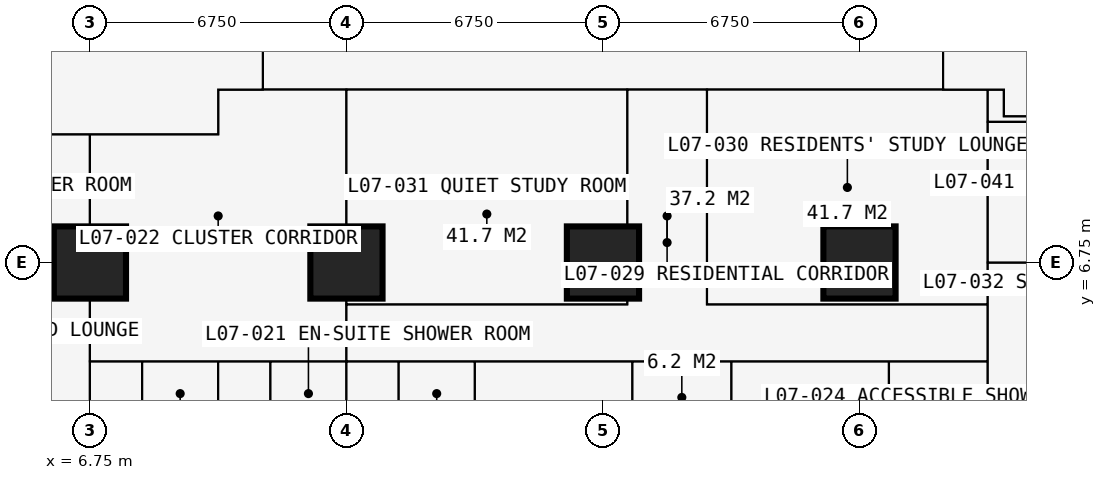
"""IFC4 building model, lengths in metres.
Left out: names, types, materials, properties, quantities, classifications, styles, units other than length and angle.
Written with IfcOpenShell. Run it as: python <this file> out.ifc"""

import sys

from ifc_helpers import new_model, si_unit, direction, frame, frame_2d, origin, origin_2d, place, context, subcontext, project, spatial, rectangle, extrude, element, fill, save


model = new_model("IFC4")
c1 = context("Model", 3, precision=1e-05, world=origin(), true_north=direction((0.0, 1.0)))
c2 = subcontext(c1, "Body", "Model", "MODEL_VIEW")
j1 = project(units=[si_unit("LENGTHUNIT", "METRE"), si_unit("PLANEANGLEUNIT", "RADIAN")], contexts=[c1])
p1 = place(None, origin())
s1 = spatial("IfcSite", under=j1, at=p1, CompositionType="ELEMENT")
p2 = place(p1, origin())
s2 = spatial("IfcBuilding", under=s1, at=p2, CompositionType="ELEMENT")
p3 = place(p2, frame((0.0, 0.0, 28.8)))
s3 = spatial("IfcBuildingStorey", under=s2, at=p3, CompositionType="ELEMENT", Elevation=28.8)
for number, where, z_axis, x_axis in (
    (1, (6.75, 6.75, 0.0), (0.0, 0.0, 1.0), (1.0, 0.0, 0.0)),
    (2, (13.5, 6.75, 0.0), (0.0, 0.0, 1.0), (1.0, 0.0, 0.0)),
    (3, (20.25, 6.75, 0.0), (0.0, 0.0, 1.0), (1.0, 0.0, 0.0)),
    (4, (27.0, 6.75, 0.0), (0.0, 0.0, 1.0), (1.0, 0.0, 0.0)),
):
    element("IfcColumn", number, at=place(p3, frame(where, z_axis=z_axis, x_axis=x_axis)), inside=s3, PredefinedType="COLUMN", context=c2, shape_type="SweptSolid", body=[
        extrude(rectangle(XDim=1.9, YDim=1.9, at=origin_2d()), origin(), (0.0, 0.0, 1.0), 3.6),
    ])
p4 = place(p3, frame((-0.734, 10.125, 0.0), z_axis=(0.0, 0.0, 1.0), x_axis=(1.0, 0.0, 0.0)))
e5 = element("IfcWall", 5, at=p4, inside=s3, PredefinedType="PARTITIONING", context=c2, shape_type="SweptSolid", body=[
    extrude(rectangle(XDim=10.859, YDim=0.15, at=frame_2d((5.429, 0.0))), origin(), (0.0, 0.0, 1.0), 3.375),
])
p5 = place(p4, frame((5.134, 0.0, 0.0)))
e6 = element("IfcOpeningElement", 6, at=p5, cuts=e5, PredefinedType="OPENING", context=c2, shape_type="SweptSolid", body=[
    extrude(rectangle(XDim=1.0, YDim=2.2, at=frame_2d((0.5, 1.1))), frame((0.0, 0.085, 0.0), z_axis=(0.0, -1.0, 0.0), x_axis=(1.0, 0.0, 0.0)), (0.0, 0.0, 1.0), 0.17),
])
p6 = place(p3, frame((6.75, -0.734, 0.0), z_axis=(0.0, 0.0, 1.0), x_axis=(0.0, 1.0, 0.0)))
e7 = element("IfcWall", 7, at=p6, inside=s3, PredefinedType="PARTITIONING", context=c2, shape_type="SweptSolid", body=[
    extrude(rectangle(XDim=10.859, YDim=0.15, at=frame_2d((5.429, 0.0))), origin(), (0.0, 0.0, 1.0), 2.877),
])
p7 = place(p3, frame((6.75, 4.15, 0.0), z_axis=(0.0, 0.0, 1.0), x_axis=(1.0, 0.0, 0.0)))
e8 = element("IfcWall", 8, at=p7, inside=s3, PredefinedType="PARTITIONING", context=c2, shape_type="SweptSolid", body=[
    extrude(rectangle(XDim=23.625, YDim=0.15, at=frame_2d((11.812, 0.0))), origin(), (0.0, 0.0, 1.0), 3.375),
])
p8 = place(p7, frame((0.2, 0.0, 0.0)))
e9 = element("IfcOpeningElement", 9, at=p8, cuts=e8, PredefinedType="OPENING", context=c2, shape_type="SweptSolid", body=[
    extrude(rectangle(XDim=0.95, YDim=2.2, at=frame_2d((0.475, 1.1))), frame((0.0, 0.085, 0.0), z_axis=(0.0, -1.0, 0.0), x_axis=(1.0, 0.0, 0.0)), (0.0, 0.0, 1.0), 0.17),
])
p9 = place(p7, frame((3.625, 0.0, 0.0)))
e10 = element("IfcOpeningElement", 10, at=p9, cuts=e8, PredefinedType="OPENING", context=c2, shape_type="SweptSolid", body=[
    extrude(rectangle(XDim=0.95, YDim=2.2, at=frame_2d((0.475, 1.1))), frame((0.0, 0.085, 0.0), z_axis=(0.0, -1.0, 0.0), x_axis=(1.0, 0.0, 0.0)), (0.0, 0.0, 1.0), 0.17),
])
p10 = place(p7, frame((18.475, 0.0, 0.0)))
e11 = element("IfcOpeningElement", 11, at=p10, cuts=e8, PredefinedType="OPENING", context=c2, shape_type="SweptSolid", body=[
    extrude(rectangle(XDim=0.95, YDim=2.2, at=frame_2d((0.475, 1.1))), frame((0.0, 0.085, 0.0), z_axis=(0.0, -1.0, 0.0), x_axis=(1.0, 0.0, 0.0)), (0.0, 0.0, 1.0), 0.17),
])
p11 = place(p7, frame((11.725, 0.0, 0.0)))
e12 = element("IfcOpeningElement", 12, at=p11, cuts=e8, PredefinedType="OPENING", context=c2, shape_type="SweptSolid", body=[
    extrude(rectangle(XDim=0.95, YDim=2.2, at=frame_2d((0.475, 1.1))), frame((0.0, 0.085, 0.0), z_axis=(0.0, -1.0, 0.0), x_axis=(1.0, 0.0, 0.0)), (0.0, 0.0, 1.0), 0.17),
])
p12 = place(p7, frame((6.95, 0.0, 0.0)))
e13 = element("IfcOpeningElement", 13, at=p12, cuts=e8, PredefinedType="OPENING", context=c2, shape_type="SweptSolid", body=[
    extrude(rectangle(XDim=0.95, YDim=2.2, at=frame_2d((0.475, 1.1))), frame((0.0, 0.085, 0.0), z_axis=(0.0, -1.0, 0.0), x_axis=(1.0, 0.0, 0.0)), (0.0, 0.0, 1.0), 0.17),
])
p13 = place(p3, frame((8.125, 1.95, 0.0), z_axis=(0.0, 0.0, 1.0), x_axis=(0.0, 1.0, 0.0)))
e14 = element("IfcWall", 14, at=p13, inside=s3, PredefinedType="PARTITIONING", context=c2, shape_type="SweptSolid", body=[
    extrude(rectangle(XDim=2.2, YDim=0.1, at=frame_2d((1.1, 0.0))), origin(), (0.0, 0.0, 1.0), 3.375),
])
p14 = place(p13, frame((0.65, 0.0, 0.0)))
e15 = element("IfcOpeningElement", 15, at=p14, cuts=e14, PredefinedType="OPENING", context=c2, shape_type="SweptSolid", body=[
    extrude(rectangle(XDim=0.9, YDim=2.2, at=frame_2d((0.45, 1.1))), frame((0.0, 0.06, 0.0), z_axis=(0.0, -1.0, 0.0), x_axis=(1.0, 0.0, 0.0)), (0.0, 0.0, 1.0), 0.12),
])
p15 = place(p3, frame((10.125, -0.734, 0.0), z_axis=(0.0, 0.0, 1.0), x_axis=(0.0, 1.0, 0.0)))
e16 = element("IfcWall", 16, at=p15, inside=s3, PredefinedType="PARTITIONING", context=c2, shape_type="SweptSolid", body=[
    extrude(rectangle(XDim=4.884, YDim=0.175, at=frame_2d((2.442, 0.0))), origin(), (0.0, 0.0, 1.0), 3.375),
])
p16 = place(p3, frame((10.125, 10.125, 0.0), z_axis=(0.0, 0.0, 1.0), x_axis=(0.0, 1.0, 0.0)))
e17 = element("IfcWall", 17, at=p16, inside=s3, PredefinedType="PARTITIONING", context=c2, shape_type="SweptSolid", body=[
    extrude(rectangle(XDim=1.175, YDim=0.15, at=frame_2d((0.587, 0.0))), origin(), (0.0, 0.0, 1.0), 3.375),
])
p17 = place(p3, frame((10.125, 11.3, 0.0), z_axis=(0.0, 0.0, 1.0), x_axis=(1.0, 0.0, 0.0)))
e18 = element("IfcWall", 18, at=p17, inside=s3, PredefinedType="PARTITIONING", context=c2, shape_type="SweptSolid", body=[
    extrude(rectangle(XDim=20.675, YDim=0.15, at=frame_2d((10.337, 0.0))), origin(), (0.0, 0.0, 1.0), 3.375),
])
p18 = place(p17, frame((1.775, 0.0, 0.0)))
e19 = element("IfcOpeningElement", 19, at=p18, cuts=e18, PredefinedType="OPENING", context=c2, shape_type="SweptSolid", body=[
    extrude(rectangle(XDim=1.0, YDim=2.2, at=frame_2d((0.5, 1.1))), frame((0.0, 0.085, 0.0), z_axis=(0.0, -1.0, 0.0), x_axis=(1.0, 0.0, 0.0)), (0.0, 0.0, 1.0), 0.17),
])
p19 = place(p17, frame((11.312, 0.0, 0.0)))
e20 = element("IfcOpeningElement", 20, at=p19, cuts=e18, PredefinedType="OPENING", context=c2, shape_type="SweptSolid", body=[
    extrude(rectangle(XDim=1.0, YDim=2.2, at=frame_2d((0.5, 1.1))), frame((0.0, 0.085, 0.0), z_axis=(0.0, -1.0, 0.0), x_axis=(1.0, 0.0, 0.0)), (0.0, 0.0, 1.0), 0.17),
])
p20 = place(p3, frame((11.3, 11.3, 0.0), z_axis=(0.0, 0.0, 1.0), x_axis=(0.0, 1.0, 0.0)))
e21 = element("IfcWall", 21, at=p20, inside=s3, PredefinedType="PARTITIONING", context=c2, shape_type="SweptSolid", body=[
    extrude(rectangle(XDim=19.075, YDim=0.15, at=frame_2d((9.538, 0.0))), origin(), (0.0, 0.0, 1.0), 3.375),
])
p21 = place(p20, frame((10.137, 0.0, 0.0)))
e22 = element("IfcOpeningElement", 22, at=p21, cuts=e21, PredefinedType="OPENING", context=c2, shape_type="SweptSolid", body=[
    extrude(rectangle(XDim=1.0, YDim=2.2, at=frame_2d((0.5, 1.1))), frame((0.0, 0.085, 0.0), z_axis=(0.0, -1.0, 0.0), x_axis=(1.0, 0.0, 0.0)), (0.0, 0.0, 1.0), 0.17),
])
p22 = place(p3, frame((11.5, 1.95, 0.0), z_axis=(0.0, 0.0, 1.0), x_axis=(0.0, 1.0, 0.0)))
e23 = element("IfcWall", 23, at=p22, inside=s3, PredefinedType="PARTITIONING", context=c2, shape_type="SweptSolid", body=[
    extrude(rectangle(XDim=2.2, YDim=0.1, at=frame_2d((1.1, 0.0))), origin(), (0.0, 0.0, 1.0), 3.375),
])
p23 = place(p22, frame((0.65, 0.0, 0.0)))
e24 = element("IfcOpeningElement", 24, at=p23, cuts=e23, PredefinedType="OPENING", context=c2, shape_type="SweptSolid", body=[
    extrude(rectangle(XDim=0.9, YDim=2.2, at=frame_2d((0.45, 1.1))), frame((0.0, 0.06, 0.0), z_axis=(0.0, -1.0, 0.0), x_axis=(1.0, 0.0, 0.0)), (0.0, 0.0, 1.0), 0.12),
])
p24 = place(p3, frame((13.5, -0.734, 0.0), z_axis=(0.0, 0.0, 1.0), x_axis=(0.0, 1.0, 0.0)))
e25 = element("IfcWall", 25, at=p24, inside=s3, PredefinedType="PARTITIONING", context=c2, shape_type="SweptSolid", body=[
    extrude(rectangle(XDim=12.034, YDim=0.15, at=frame_2d((6.017, 0.0))), origin(), (0.0, 0.0, 1.0), 2.61),
])
p25 = place(p3, frame((13.5, 5.65, 0.0), z_axis=(0.0, 0.0, 1.0), x_axis=(1.0, 0.0, 0.0)))
e26 = element("IfcWall", 26, at=p25, inside=s3, PredefinedType="PARTITIONING", context=c2, shape_type="SweptSolid", body=[
    extrude(rectangle(XDim=7.387, YDim=0.15, at=frame_2d((3.694, 0.0))), origin(), (0.0, 0.0, 1.0), 3.375),
])
p26 = place(p25, frame((3.2, 0.0, 0.0)))
e27 = element("IfcOpeningElement", 27, at=p26, cuts=e26, PredefinedType="OPENING", context=c2, shape_type="SweptSolid", body=[
    extrude(rectangle(XDim=0.95, YDim=2.2, at=frame_2d((0.475, 1.1))), frame((0.0, 0.085, 0.0), z_axis=(0.0, -1.0, 0.0), x_axis=(1.0, 0.0, 0.0)), (0.0, 0.0, 1.0), 0.17),
])
p27 = place(p3, frame((14.875, 1.95, 0.0), z_axis=(0.0, 0.0, 1.0), x_axis=(0.0, 1.0, 0.0)))
e28 = element("IfcWall", 28, at=p27, inside=s3, PredefinedType="PARTITIONING", context=c2, shape_type="SweptSolid", body=[
    extrude(rectangle(XDim=2.2, YDim=0.1, at=frame_2d((1.1, 0.0))), origin(), (0.0, 0.0, 1.0), 3.375),
])
p28 = place(p3, frame((16.875, -0.734, 0.0), z_axis=(0.0, 0.0, 1.0), x_axis=(0.0, 1.0, 0.0)))
e29 = element("IfcWall", 29, at=p28, inside=s3, PredefinedType="PARTITIONING", context=c2, shape_type="SweptSolid", body=[
    extrude(rectangle(XDim=4.884, YDim=0.175, at=frame_2d((2.442, 0.0))), origin(), (0.0, 0.0, 1.0), 3.375),
])
p29 = place(p28, frame((3.334, 0.0, 0.0)))
e30 = element("IfcOpeningElement", 30, at=p29, cuts=e29, PredefinedType="OPENING", context=c2, shape_type="SweptSolid", body=[
    extrude(rectangle(XDim=0.9, YDim=2.2, at=frame_2d((0.45, 1.1))), frame((0.0, 0.097, 0.0), z_axis=(0.0, -1.0, 0.0), x_axis=(1.0, 0.0, 0.0)), (0.0, 0.0, 1.0), 0.195),
])
p30 = place(p3, frame((20.887, 5.65, 0.0), z_axis=(0.0, 0.0, 1.0), x_axis=(0.0, 1.0, 0.0)))
e31 = element("IfcWall", 31, at=p30, inside=s3, PredefinedType="PARTITIONING", context=c2, shape_type="SweptSolid", body=[
    extrude(rectangle(XDim=5.65, YDim=0.15, at=frame_2d((2.825, 0.0))), origin(), (0.0, 0.0, 1.0), 3.375),
])
p31 = place(p3, frame((21.025, 1.75, 0.0), z_axis=(0.0, 0.0, 1.0), x_axis=(0.0, 1.0, 0.0)))
e32 = element("IfcWall", 32, at=p31, inside=s3, PredefinedType="PARTITIONING", context=c2, shape_type="SweptSolid", body=[
    extrude(rectangle(XDim=2.4, YDim=0.1, at=frame_2d((1.2, 0.0))), origin(), (0.0, 0.0, 1.0), 3.375),
])
p32 = place(p3, frame((22.988, 5.65, 0.0), z_axis=(0.0, 0.0, 1.0), x_axis=(1.0, 0.0, 0.0)))
e33 = element("IfcWall", 33, at=p32, inside=s3, PredefinedType="PARTITIONING", context=c2, shape_type="SweptSolid", body=[
    extrude(rectangle(XDim=7.387, YDim=0.15, at=frame_2d((3.694, 0.0))), origin(), (0.0, 0.0, 1.0), 3.375),
])
p33 = place(p32, frame((2.1, 0.0, 0.0)))
e34 = element("IfcOpeningElement", 34, at=p33, cuts=e33, PredefinedType="OPENING", context=c2, shape_type="SweptSolid", body=[
    extrude(rectangle(XDim=0.95, YDim=2.2, at=frame_2d((0.475, 1.1))), frame((0.0, 0.085, 0.0), z_axis=(0.0, -1.0, 0.0), x_axis=(1.0, 0.0, 0.0)), (0.0, 0.0, 1.0), 0.17),
])
p34 = place(p3, frame((22.988, 5.65, 0.0), z_axis=(0.0, 0.0, 1.0), x_axis=(0.0, 1.0, 0.0)))
e35 = element("IfcWall", 35, at=p34, inside=s3, PredefinedType="PARTITIONING", context=c2, shape_type="SweptSolid", body=[
    extrude(rectangle(XDim=5.65, YDim=0.15, at=frame_2d((2.825, 0.0))), origin(), (0.0, 0.0, 1.0), 3.375),
])
p35 = place(p3, frame((23.625, -0.734, 0.0), z_axis=(0.0, 0.0, 1.0), x_axis=(0.0, 1.0, 0.0)))
e36 = element("IfcWall", 36, at=p35, inside=s3, PredefinedType="PARTITIONING", context=c2, shape_type="SweptSolid", body=[
    extrude(rectangle(XDim=4.884, YDim=0.175, at=frame_2d((2.442, 0.0))), origin(), (0.0, 0.0, 1.0), 3.375),
])
p36 = place(p35, frame((3.234, 0.0, 0.0)))
e37 = element("IfcOpeningElement", 37, at=p36, cuts=e36, PredefinedType="OPENING", context=c2, shape_type="SweptSolid", body=[
    extrude(rectangle(XDim=0.9, YDim=2.2, at=frame_2d((0.45, 1.1))), frame((0.0, 0.097, 0.0), z_axis=(0.0, -1.0, 0.0), x_axis=(1.0, 0.0, 0.0)), (0.0, 0.0, 1.0), 0.195),
])
p37 = place(p3, frame((27.775, 1.75, 0.0), z_axis=(0.0, 0.0, 1.0), x_axis=(0.0, 1.0, 0.0)))
e38 = element("IfcWall", 38, at=p37, inside=s3, PredefinedType="PARTITIONING", context=c2, shape_type="SweptSolid", body=[
    extrude(rectangle(XDim=2.4, YDim=0.1, at=frame_2d((1.2, 0.0))), origin(), (0.0, 0.0, 1.0), 3.375),
])
p38 = place(p3, frame((29.2, 11.3, 0.0), z_axis=(0.0, 0.0, 1.0), x_axis=(0.0, 1.0, 0.0)))
e39 = element("IfcWall", 39, at=p38, inside=s3, PredefinedType="PARTITIONING", context=c2, shape_type="SweptSolid", body=[
    extrude(rectangle(XDim=17.9, YDim=0.2, at=frame_2d((8.95, 0.0))), origin(), (0.0, 0.0, 1.0), 3.375),
])
p39 = place(p38, frame((8.35, 0.0, 0.0)))
e40 = element("IfcOpeningElement", 40, at=p39, cuts=e39, PredefinedType="OPENING", context=c2, shape_type="SweptSolid", body=[
    extrude(rectangle(XDim=1.2, YDim=2.2, at=frame_2d((0.6, 1.1))), frame((0.0, 0.11, 0.0), z_axis=(0.0, -1.0, 0.0), x_axis=(1.0, 0.0, 0.0)), (0.0, 0.0, 1.0), 0.22),
])
p40 = place(p3, frame((30.375, -0.734, 0.0), z_axis=(0.0, 0.0, 1.0), x_axis=(0.0, 1.0, 0.0)))
e41 = element("IfcWall", 41, at=p40, inside=s3, PredefinedType="PARTITIONING", context=c2, shape_type="SweptSolid", body=[
    extrude(rectangle(XDim=12.034, YDim=0.15, at=frame_2d((6.017, 0.0))), origin(), (0.0, 0.0, 1.0), 3.375),
])
p41 = place(p40, frame((5.134, 0.0, 0.0)))
e42 = element("IfcOpeningElement", 42, at=p41, cuts=e41, PredefinedType="OPENING", context=c2, shape_type="SweptSolid", body=[
    extrude(rectangle(XDim=1.0, YDim=2.2, at=frame_2d((0.5, 1.1))), frame((0.0, 0.085, 0.0), z_axis=(0.0, -1.0, 0.0), x_axis=(1.0, 0.0, 0.0)), (0.0, 0.0, 1.0), 0.17),
])
p42 = place(p3, frame((30.375, 6.75, 0.0), z_axis=(0.0, 0.0, 1.0), x_axis=(1.0, 0.0, 0.0)))
e43 = element("IfcWall", 43, at=p42, inside=s3, PredefinedType="PARTITIONING", context=c2, shape_type="SweptSolid", body=[
    extrude(rectangle(XDim=5.975, YDim=0.15, at=frame_2d((2.988, 0.0))), origin(), (0.0, 0.0, 1.0), 2.877),
])
p43 = place(p3, frame((30.375, 10.45, 0.0), z_axis=(0.0, 0.0, 1.0), x_axis=(1.0, 0.0, 0.0)))
e44 = element("IfcWall", 44, at=p43, inside=s3, PredefinedType="PARTITIONING", context=c2, shape_type="SweptSolid", body=[
    extrude(rectangle(XDim=4.475, YDim=0.15, at=frame_2d((2.238, 0.0))), origin(), (0.0, 0.0, 1.0), 3.375),
])
p44 = place(p43, frame((2.35, 0.0, 0.0)))
e45 = element("IfcOpeningElement", 45, at=p44, cuts=e44, PredefinedType="OPENING", context=c2, shape_type="SweptSolid", body=[
    extrude(rectangle(XDim=0.95, YDim=2.2, at=frame_2d((0.475, 1.1))), frame((0.0, 0.085, 0.0), z_axis=(0.0, -1.0, 0.0), x_axis=(1.0, 0.0, 0.0)), (0.0, 0.0, 1.0), 0.17),
])
p45 = place(p3, frame((30.8, 10.6, 0.0), z_axis=(0.0, 0.0, 1.0), x_axis=(0.0, 1.0, 0.0)))
e46 = element("IfcWall", 46, at=p45, inside=s3, PredefinedType="PARTITIONING", context=c2, shape_type="SweptSolid", body=[
    extrude(rectangle(XDim=0.7, YDim=0.15, at=frame_2d((0.35, 0.0))), origin(), (0.0, 0.0, 1.0), 3.375),
])
p46 = place(p3, frame((30.8, 10.6, 0.0), z_axis=(0.0, 0.0, 1.0), x_axis=(1.0, 0.0, 0.0)))
e47 = element("IfcWall", 47, at=p46, inside=s3, PredefinedType="PARTITIONING", context=c2, shape_type="SweptSolid", body=[
    extrude(rectangle(XDim=1.85, YDim=0.15, at=frame_2d((0.925, 0.0))), origin(), (0.0, 0.0, 1.0), 3.375),
])
p47 = place(p8, origin())
e48 = element("IfcDoor", 48, at=p47, inside=s3, OperationType="SINGLE_SWING_LEFT", PredefinedType="DOOR", context=c2, shape_type="SweptSolid", body=[
    extrude(rectangle(XDim=0.95, YDim=2.2, at=frame_2d((0.475, 1.1))), frame((0.0, 0.025, 0.0), z_axis=(0.0, -1.0, 0.0), x_axis=(1.0, 0.0, 0.0)), (0.0, 0.0, 1.0), 0.05),
])
fill(e9, e48)
p48 = place(p14, origin())
e49 = element("IfcDoor", 49, at=p48, inside=s3, OperationType="SINGLE_SWING_RIGHT", PredefinedType="DOOR", context=c2, shape_type="SweptSolid", body=[
    extrude(rectangle(XDim=0.9, YDim=2.2, at=frame_2d((0.45, 1.1))), frame((0.0, 0.025, 0.0), z_axis=(0.0, -1.0, 0.0), x_axis=(1.0, 0.0, 0.0)), (0.0, 0.0, 1.0), 0.05),
])
fill(e15, e49)
p49 = place(p9, origin())
e50 = element("IfcDoor", 50, at=p49, inside=s3, OperationType="SINGLE_SWING_LEFT", PredefinedType="DOOR", context=c2, shape_type="SweptSolid", body=[
    extrude(rectangle(XDim=0.95, YDim=2.2, at=frame_2d((0.475, 1.1))), frame((0.0, 0.025, 0.0), z_axis=(0.0, -1.0, 0.0), x_axis=(1.0, 0.0, 0.0)), (0.0, 0.0, 1.0), 0.05),
])
fill(e10, e50)
p50 = place(p23, origin())
e51 = element("IfcDoor", 51, at=p50, inside=s3, OperationType="SINGLE_SWING_RIGHT", PredefinedType="DOOR", context=c2, shape_type="SweptSolid", body=[
    extrude(rectangle(XDim=0.9, YDim=2.2, at=frame_2d((0.45, 1.1))), frame((0.0, 0.025, 0.0), z_axis=(0.0, -1.0, 0.0), x_axis=(1.0, 0.0, 0.0)), (0.0, 0.0, 1.0), 0.05),
])
fill(e24, e51)
p51 = place(p18, origin())
e52 = element("IfcDoor", 52, at=p51, inside=s3, OperationType="SINGLE_SWING_LEFT", PredefinedType="DOOR", context=c2, shape_type="SweptSolid", body=[
    extrude(rectangle(XDim=1.0, YDim=2.2, at=frame_2d((0.5, 1.1))), frame((0.0, 0.025, 0.0), z_axis=(0.0, -1.0, 0.0), x_axis=(1.0, 0.0, 0.0)), (0.0, 0.0, 1.0), 0.05),
])
fill(e19, e52)
p52 = place(p10, origin())
e53 = element("IfcDoor", 53, at=p52, inside=s3, OperationType="SINGLE_SWING_LEFT", PredefinedType="DOOR", context=c2, shape_type="SweptSolid", body=[
    extrude(rectangle(XDim=0.95, YDim=2.2, at=frame_2d((0.475, 1.1))), frame((0.0, 0.025, 0.0), z_axis=(0.0, -1.0, 0.0), x_axis=(1.0, 0.0, 0.0)), (0.0, 0.0, 1.0), 0.05),
])
fill(e11, e53)
p53 = place(p11, origin())
e54 = element("IfcDoor", 54, at=p53, inside=s3, OperationType="SINGLE_SWING_LEFT", PredefinedType="DOOR", context=c2, shape_type="SweptSolid", body=[
    extrude(rectangle(XDim=0.95, YDim=2.2, at=frame_2d((0.475, 1.1))), frame((0.0, 0.025, 0.0), z_axis=(0.0, -1.0, 0.0), x_axis=(1.0, 0.0, 0.0)), (0.0, 0.0, 1.0), 0.05),
])
fill(e12, e54)
p54 = place(p36, origin())
e55 = element("IfcDoor", 55, at=p54, inside=s3, OperationType="SINGLE_SWING_RIGHT", PredefinedType="DOOR", context=c2, shape_type="SweptSolid", body=[
    extrude(rectangle(XDim=0.9, YDim=2.2, at=frame_2d((0.45, 1.1))), frame((0.0, 0.025, 0.0), z_axis=(0.0, -1.0, 0.0), x_axis=(1.0, 0.0, 0.0)), (0.0, 0.0, 1.0), 0.05),
])
fill(e37, e55)
p55 = place(p12, origin())
e56 = element("IfcDoor", 56, at=p55, inside=s3, OperationType="SINGLE_SWING_LEFT", PredefinedType="DOOR", context=c2, shape_type="SweptSolid", body=[
    extrude(rectangle(XDim=0.95, YDim=2.2, at=frame_2d((0.475, 1.1))), frame((0.0, 0.025, 0.0), z_axis=(0.0, -1.0, 0.0), x_axis=(1.0, 0.0, 0.0)), (0.0, 0.0, 1.0), 0.05),
])
fill(e13, e56)
p56 = place(p29, origin())
e57 = element("IfcDoor", 57, at=p56, inside=s3, OperationType="SINGLE_SWING_RIGHT", PredefinedType="DOOR", context=c2, shape_type="SweptSolid", body=[
    extrude(rectangle(XDim=0.9, YDim=2.2, at=frame_2d((0.45, 1.1))), frame((0.0, 0.025, 0.0), z_axis=(0.0, -1.0, 0.0), x_axis=(1.0, 0.0, 0.0)), (0.0, 0.0, 1.0), 0.05),
])
fill(e30, e57)
p57 = place(p19, origin())
e58 = element("IfcDoor", 58, at=p57, inside=s3, OperationType="SINGLE_SWING_LEFT", PredefinedType="DOOR", context=c2, shape_type="SweptSolid", body=[
    extrude(rectangle(XDim=1.0, YDim=2.2, at=frame_2d((0.5, 1.1))), frame((0.0, 0.025, 0.0), z_axis=(0.0, -1.0, 0.0), x_axis=(1.0, 0.0, 0.0)), (0.0, 0.0, 1.0), 0.05),
])
fill(e20, e58)
p58 = place(p33, origin())
e59 = element("IfcDoor", 59, at=p58, inside=s3, OperationType="SINGLE_SWING_LEFT", PredefinedType="DOOR", context=c2, shape_type="SweptSolid", body=[
    extrude(rectangle(XDim=0.95, YDim=2.2, at=frame_2d((0.475, 1.1))), frame((0.0, 0.025, 0.0), z_axis=(0.0, -1.0, 0.0), x_axis=(1.0, 0.0, 0.0)), (0.0, 0.0, 1.0), 0.05),
])
fill(e34, e59)
p59 = place(p26, origin())
e60 = element("IfcDoor", 60, at=p59, inside=s3, OperationType="SINGLE_SWING_LEFT", PredefinedType="DOOR", context=c2, shape_type="SweptSolid", body=[
    extrude(rectangle(XDim=0.95, YDim=2.2, at=frame_2d((0.475, 1.1))), frame((0.0, 0.025, 0.0), z_axis=(0.0, -1.0, 0.0), x_axis=(1.0, 0.0, 0.0)), (0.0, 0.0, 1.0), 0.05),
])
fill(e27, e60)
p60 = place(p41, origin())
e61 = element("IfcDoor", 61, at=p60, inside=s3, OperationType="SINGLE_SWING_LEFT", PredefinedType="DOOR", context=c2, shape_type="SweptSolid", body=[
    extrude(rectangle(XDim=1.0, YDim=2.2, at=frame_2d((0.5, 1.1))), frame((0.0, 0.025, 0.0), z_axis=(0.0, -1.0, 0.0), x_axis=(1.0, 0.0, 0.0)), (0.0, 0.0, 1.0), 0.05),
])
fill(e42, e61)
save(model, sys.argv[1])
